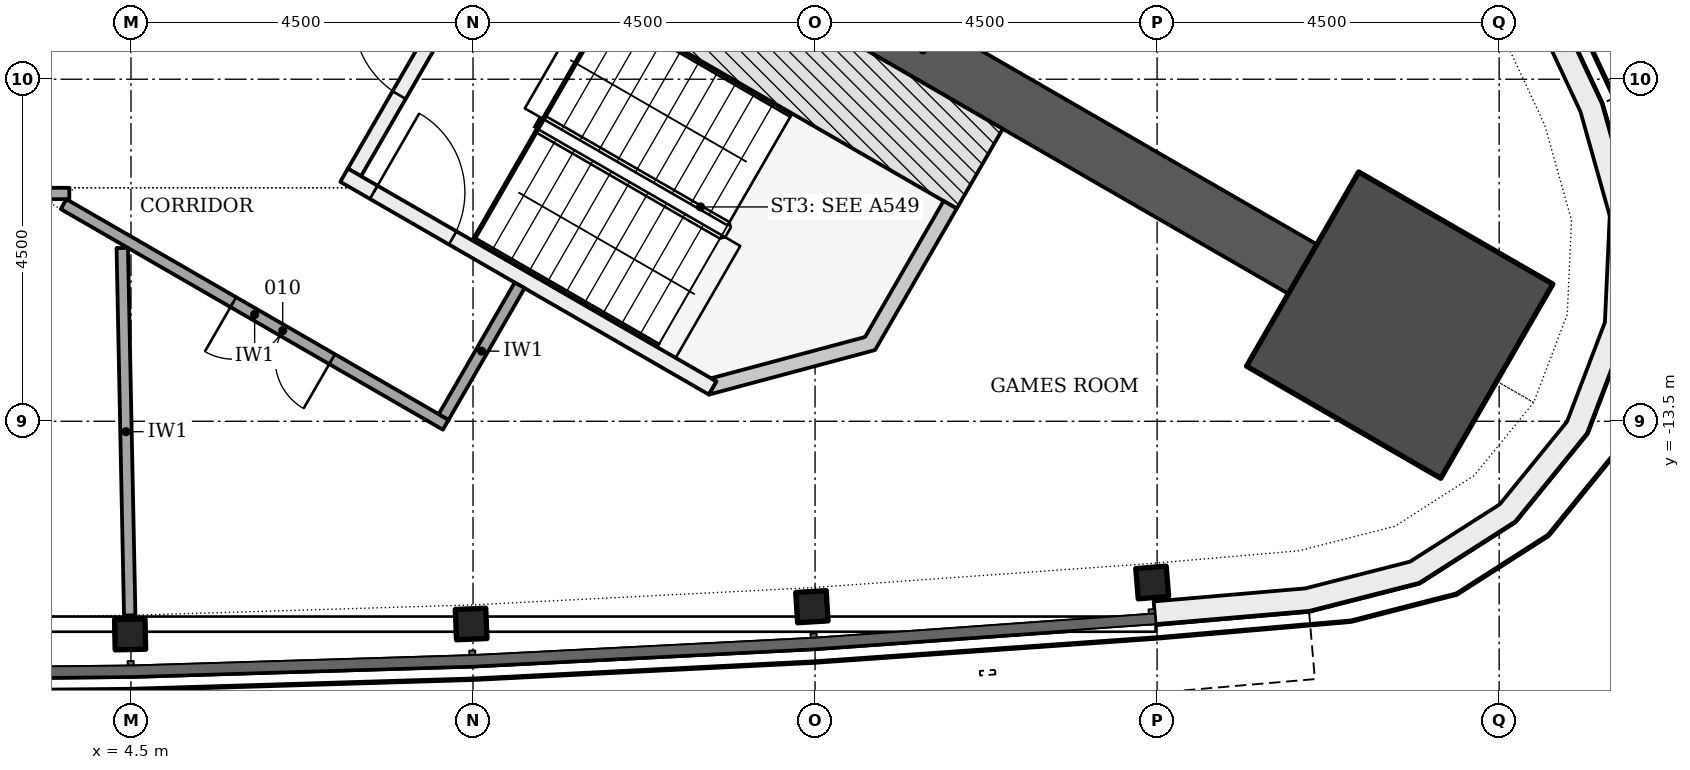
"""IFC4 building model, lengths in metres.
Left out: names, types, materials, properties, quantities, classifications, styles, units other than length and angle.
Written with IfcOpenShell. Run it as: python <this file> out.ifc"""

import sys

from ifc_helpers import new_model, si_unit, direction, frame, frame_2d, origin, origin_2d, place, context, subcontext, project, spatial, polyline, rectangle, i_section, outline, extrude, element, fill, save


model = new_model("IFC4")
c1 = context("Model", 3, precision=1e-05, world=origin(), true_north=direction((0.0, 1.0)))
c2 = subcontext(c1, "Body", "Model", "MODEL_VIEW")
j1 = project(units=[si_unit("LENGTHUNIT", "METRE"), si_unit("PLANEANGLEUNIT", "RADIAN")], contexts=[c1])
p1 = place(None, origin())
s1 = spatial("IfcSite", under=j1, at=p1, CompositionType="ELEMENT")
p2 = place(p1, origin())
s2 = spatial("IfcBuilding", under=s1, at=p2, CompositionType="ELEMENT")
p3 = place(p2, frame((0.0, 0.0, 116.7)))
s3 = spatial("IfcBuildingStorey", under=s2, at=p3, CompositionType="ELEMENT", Elevation=116.7)
p4 = place(p3, frame((9.922, -5.728, -0.2), z_axis=(0.0, 0.0, 1.0), x_axis=(0.866024913782, -0.500000848707, 0.0)))
e1 = element("IfcWall", 1, at=p4, inside=s3, PredefinedType="SHEAR", context=c2, shape_type="SweptSolid", body=[
    extrude(rectangle(XDim=11.539, YDim=0.75, at=frame_2d((5.769, 0.0))), origin(), (0.0, 0.0, 1.0), 3.6),
])
p5 = place(p3, frame((21.192, -12.235, -0.2), z_axis=(0.0, 0.0, 1.0), x_axis=(0.866025403784, -0.5, 0.0)))
e2 = element("IfcColumn", 2, at=p5, inside=s3, PredefinedType="COLUMN", context=c2, shape_type="SweptSolid", body=[
    extrude(rectangle(XDim=2.95, YDim=2.95, at=origin_2d()), origin(), (0.0, 0.0, 1.0), 3.6),
])
for number, where, z_axis, x_axis in (
    (3, (4.489, -16.304, -0.2), (0.0, 0.0, 1.0), (1.0, 0.02, 0.0)),
    (4, (8.975, -16.167, -0.2), (0.0, 0.0, 1.0), (0.999, 0.041, 0.0)),
    (5, (13.458, -15.939, -0.2), (0.0, 0.0, 1.0), (0.998, 0.061, 0.0)),
    (6, (17.936, -15.621, -0.2), (0.0, 0.0, 1.0), (0.997, 0.081, 0.0)),
):
    element("IfcColumn", number, at=place(p3, frame(where, z_axis=z_axis, x_axis=x_axis)), inside=s3, PredefinedType="COLUMN", context=c2, shape_type="SweptSolid", body=[
        extrude(i_section(OverallWidth=0.401, OverallDepth=0.399, WebThickness=0.025, FlangeThickness=0.04, FilletRadius=0.015, at=origin_2d()), origin(), (0.0, 0.0, 1.0), 3.6),
    ])
p6 = place(p3, origin())
e7 = element("IfcWall", 7, at=p6, inside=s3, PredefinedType="NOTDEFINED", context=c2, shape_type="SweptSolid", body=[
    extrude(outline(polyline([(17.98, -16.169), (19.999, -15.995), (21.449, -15.625), (22.711, -14.819), (23.656, -13.658), (24.189, -12.259), (24.257, -10.763), (23.852, -9.322), (22.993, -7.487), (22.721, -7.614), (23.57, -9.426), (23.955, -10.798), (23.891, -12.197), (23.393, -13.506), (22.509, -14.592), (21.328, -15.347), (19.948, -15.699), (17.955, -15.87), (17.98, -16.169)])), origin(), (0.0, 0.0, 1.0), 3.3),
])
p7 = place(p3, frame((7.44, -10.226, -0.2), z_axis=(0.0, 0.0, 1.0), x_axis=(0.500022077904, 0.866012656725, 0.0)))
e8 = element("IfcWall", 8, at=p7, inside=s3, PredefinedType="SHEAR", context=c2, shape_type="SweptSolid", body=[
    extrude(rectangle(XDim=3.55, YDim=0.2, at=frame_2d((1.775, 0.0))), origin(), (0.0, 0.0, 1.0), 3.6),
])
p8 = place(p7, frame((1.175, 0.0, 0.2)))
e9 = element("IfcOpeningElement", 9, at=p8, cuts=e8, PredefinedType="OPENING", context=c2, shape_type="SweptSolid", body=[
    extrude(rectangle(XDim=1.2, YDim=2.1, at=frame_2d((0.6, 1.05))), frame((0.0, 0.11, 0.0), z_axis=(0.0, -1.0, 0.0), x_axis=(1.0, 0.0, 0.0)), (0.0, 0.0, 1.0), 0.22),
])
p9 = place(p3, frame((7.304, -10.262, -0.2), z_axis=(0.0, 0.0, 1.0), x_axis=(0.866026594901, -0.49999793692, 0.0)))
e10 = element("IfcWall", 10, at=p9, inside=s3, PredefinedType="SHEAR", context=c2, shape_type="SweptSolid", body=[
    extrude(rectangle(XDim=5.6, YDim=0.2, at=frame_2d((2.8, 0.0))), origin(), (0.0, 0.0, 1.0), 3.6),
])
p10 = place(p9, frame((0.45, 0.0, 0.2)))
e11 = element("IfcOpeningElement", 11, at=p10, cuts=e10, PredefinedType="OPENING", context=c2, shape_type="SweptSolid", body=[
    extrude(rectangle(XDim=1.2, YDim=2.1, at=frame_2d((0.6, 1.05))), frame((0.0, 0.11, 0.0), z_axis=(0.0, -1.0, 0.0), x_axis=(1.0, 0.0, 0.0)), (0.0, 0.0, 1.0), 0.22),
])
p11 = place(p3, frame((9.431, -6.577, -0.2), z_axis=(0.0, 0.0, 1.0), x_axis=(0.866018442252, -0.500012057535, 0.0)))
e12 = element("IfcWall", 12, at=p11, inside=s3, PredefinedType="SHEAR", context=c2, shape_type="SweptSolid", body=[
    extrude(rectangle(XDim=7.2, YDim=1.211, at=frame_2d((3.6, 0.0))), origin(), (0.0, 0.0, 1.0), 3.6),
])
p12 = place(p3, frame((0.0, 0.0, -0.2)))
e13 = element("IfcWall", 13, at=p12, inside=s3, PredefinedType="SHEAR", context=c2, shape_type="SweptSolid", body=[
    extrude(outline(polyline([(12.104, -13.149), (14.289, -12.563), (15.364, -10.701), (15.191, -10.601), (14.157, -12.392), (12.132, -12.934), (12.204, -12.976), (12.204, -12.976), (12.204, -12.976), (12.204, -12.976), (12.204, -12.976), (12.204, -12.976), (12.204, -12.976), (12.204, -12.976), (12.204, -12.976), (12.204, -12.976), (12.204, -12.976), (12.204, -12.976), (12.204, -12.976), (12.204, -12.976), (12.204, -12.976), (12.204, -12.976), (12.204, -12.976), (12.104, -13.149)])), origin(), (0.0, 0.0, 1.0), 3.6),
])
p13 = place(p3, frame((3.689, -10.503, 0.0), z_axis=(0.0, 0.0, 1.0), x_axis=(-1.0, 0.0, 0.0)))
e14 = element("IfcWall", 14, at=p13, inside=s3, PredefinedType="PARTITIONING", context=c2, shape_type="SweptSolid", body=[
    extrude(rectangle(XDim=13.068, YDim=0.15, at=frame_2d((6.534, 0.0))), origin(), (0.0, 0.0, 1.0), 2.847),
])
p14 = place(p13, frame((10.668, 0.0, 0.0)))
e15 = element("IfcOpeningElement", 15, at=p14, cuts=e14, PredefinedType="OPENING", context=c2, shape_type="SweptSolid", body=[
    extrude(rectangle(XDim=1.0, YDim=2.1, at=frame_2d((0.5, 1.05))), frame((0.0, 0.085, 0.0), z_axis=(0.0, -1.0, 0.0), x_axis=(1.0, 0.0, 0.0)), (0.0, 0.0, 1.0), 0.17),
])
p15 = place(p13, frame((8.125, 0.0, 0.0)))
e16 = element("IfcOpeningElement", 16, at=p15, cuts=e14, PredefinedType="OPENING", context=c2, shape_type="SweptSolid", body=[
    extrude(rectangle(XDim=1.0, YDim=2.1, at=frame_2d((0.5, 1.05))), frame((0.0, 0.085, 0.0), z_axis=(0.0, -1.0, 0.0), x_axis=(1.0, 0.0, 0.0)), (0.0, 0.0, 1.0), 0.17),
])
p16 = place(p13, frame((2.99, 0.0, 0.0)))
e17 = element("IfcOpeningElement", 17, at=p16, cuts=e14, PredefinedType="OPENING", context=c2, shape_type="SweptSolid", body=[
    extrude(rectangle(XDim=1.5, YDim=2.1, at=frame_2d((0.75, 1.05))), frame((0.0, 0.085, 0.0), z_axis=(0.0, -1.0, 0.0), x_axis=(1.0, 0.0, 0.0)), (0.0, 0.0, 1.0), 0.17),
])
p17 = place(p3, frame((8.641, -13.546, 0.0), z_axis=(0.0, 0.0, 1.0), x_axis=(-0.866042728627, 0.499969991291, 0.0)))
e18 = element("IfcWall", 18, at=p17, inside=s3, PredefinedType="PARTITIONING", context=c2, shape_type="SweptSolid", body=[
    extrude(rectangle(XDim=5.805, YDim=0.15, at=frame_2d((2.903, 0.0))), origin(), (0.0, 0.0, 1.0), 2.847),
])
p18 = place(p17, frame((1.726, 0.0, 0.0)))
e19 = element("IfcOpeningElement", 19, at=p18, cuts=e18, PredefinedType="OPENING", context=c2, shape_type="SweptSolid", body=[
    extrude(rectangle(XDim=1.5, YDim=2.1, at=frame_2d((0.75, 1.05))), frame((0.0, 0.085, 0.0), z_axis=(0.0, -1.0, 0.0), x_axis=(1.0, 0.0, 0.0)), (0.0, 0.0, 1.0), 0.17),
])
p19 = place(p3, frame((8.614, -13.444, 0.0), z_axis=(0.0, 0.0, 1.0), x_axis=(0.499972520799, 0.866041268327, 0.0)))
e20 = element("IfcWall", 20, at=p19, inside=s3, PredefinedType="PARTITIONING", context=c2, shape_type="SweptSolid", body=[
    extrude(rectangle(XDim=2.0, YDim=0.15, at=frame_2d((1.0, 0.0))), origin(), (0.0, 0.0, 1.0), 2.923),
])
p20 = place(p3, frame((4.483, -16.054, 0.0), z_axis=(0.0, 0.0, 1.0), x_axis=(-0.020251440235, 0.999794918555, 0.0)))
e21 = element("IfcWall", 21, at=p20, inside=s3, PredefinedType="PARTITIONING", context=c2, shape_type="SweptSolid", body=[
    extrude(rectangle(XDim=4.834, YDim=0.15, at=frame_2d((2.417, 0.0))), origin(), (0.0, 0.0, 1.0), 2.847),
])
p21 = place(p8, origin())
e22 = element("IfcDoor", 22, at=p21, inside=s3, OperationType="SINGLE_SWING_RIGHT", PredefinedType="DOOR", context=c2, shape_type="SweptSolid", body=[
    extrude(rectangle(XDim=1.2, YDim=2.1, at=frame_2d((0.6, 1.05))), frame((0.0, 0.025, 0.0), z_axis=(0.0, -1.0, 0.0), x_axis=(1.0, 0.0, 0.0)), (0.0, 0.0, 1.0), 0.05),
])
fill(e9, e22)
p22 = place(p10, origin())
e23 = element("IfcDoor", 23, at=p22, inside=s3, OperationType="SINGLE_SWING_LEFT", PredefinedType="DOOR", context=c2, shape_type="SweptSolid", body=[
    extrude(rectangle(XDim=1.2, YDim=2.1, at=frame_2d((0.6, 1.05))), frame((0.0, 0.025, 0.0), z_axis=(0.0, -1.0, 0.0), x_axis=(1.0, 0.0, 0.0)), (0.0, 0.0, 1.0), 0.05),
])
fill(e11, e23)
p23 = place(p18, origin())
e24 = element("IfcDoor", 24, at=p23, inside=s3, OperationType="DOUBLE_DOOR_SINGLE_SWING", PredefinedType="DOOR", context=c2, shape_type="SweptSolid", body=[
    extrude(rectangle(XDim=1.5, YDim=2.1, at=frame_2d((0.75, 1.05))), frame((0.0, 0.025, 0.0), z_axis=(0.0, -1.0, 0.0), x_axis=(1.0, 0.0, 0.0)), (0.0, 0.0, 1.0), 0.05),
])
fill(e19, e24)
save(model, sys.argv[1])
